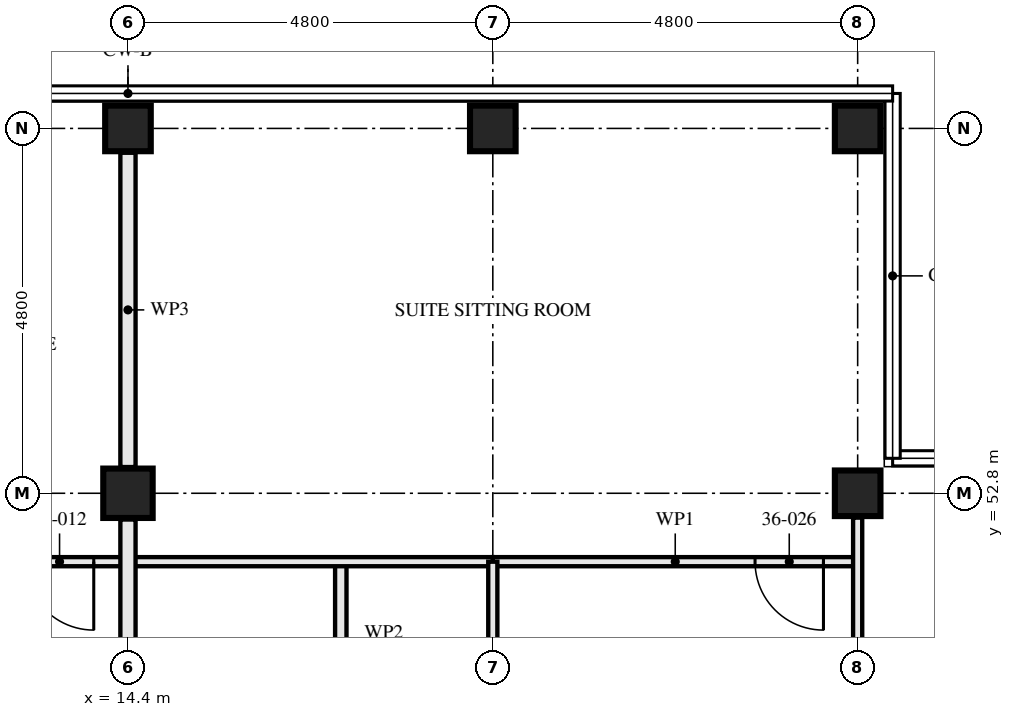
"""IFC4 building model, lengths in metres.
Left out: names, types, materials, properties, quantities, classifications, styles, units other than length and angle.
Written with IfcOpenShell. Run it as: python <this file> out.ifc"""

import sys

from ifc_helpers import new_model, si_unit, direction, frame, frame_2d, origin, origin_2d, place, context, subcontext, project, spatial, rectangle, hollow_rectangle, extrude, element, fill, save


model = new_model("IFC4")
c1 = context("Model", 3, precision=1e-05, world=origin(), true_north=direction((0.0, 1.0)))
c2 = subcontext(c1, "Body", "Model", "MODEL_VIEW")
j1 = project(units=[si_unit("LENGTHUNIT", "METRE"), si_unit("PLANEANGLEUNIT", "RADIAN")], contexts=[c1])
p1 = place(None, origin())
s1 = spatial("IfcSite", under=j1, at=p1, CompositionType="ELEMENT")
p2 = place(p1, origin())
s2 = spatial("IfcBuilding", under=s1, at=p2, CompositionType="ELEMENT")
p3 = place(p2, frame((0.0, 0.0, 133.0)))
s3 = spatial("IfcBuildingStorey", under=s2, at=p3, CompositionType="ELEMENT", Elevation=133.0)
p4 = place(p3, frame((14.4, 52.8, 0.0), z_axis=(0.0, 0.0, 1.0), x_axis=(1.0, 0.0, 0.0)))
e1 = element("IfcColumn", 1, at=p4, inside=s3, PredefinedType="COLUMN", context=c2, shape_type="SweptSolid", body=[
    extrude(hollow_rectangle(XDim=0.65, YDim=0.65, WallThickness=0.05, at=origin_2d()), origin(), (0.0, 0.0, 1.0), 3.5),
])
for number, where, z_axis, x_axis in (
    (2, (14.4, 57.6, 0.0), (0.0, 0.0, 1.0), (0.0, 1.0, 0.0)),
    (3, (19.2, 57.6, 0.0), (0.0, 0.0, 1.0), (0.0, 1.0, 0.0)),
    (4, (24.0, 52.8, 0.0), (0.0, 0.0, 1.0), (0.0, 1.0, 0.0)),
    (5, (24.0, 57.6, 0.0), (0.0, 0.0, 1.0), (0.0, 1.0, 0.0)),
):
    element("IfcColumn", number, at=place(p3, frame(where, z_axis=z_axis, x_axis=x_axis)), inside=s3, PredefinedType="COLUMN", context=c2, shape_type="SweptSolid", body=[
        extrude(hollow_rectangle(XDim=0.6, YDim=0.6, WallThickness=0.08, at=origin_2d()), origin(), (0.0, 0.0, 1.0), 3.5),
    ])
p5 = place(p3, frame((14.4, 51.9, 0.0), z_axis=(0.0, 0.0, 1.0), x_axis=(-1.0, 0.0, 0.0)))
e6 = element("IfcWall", 6, at=p5, inside=s3, PredefinedType="PARTITIONING", context=c2, shape_type="SweptSolid", body=[
    extrude(rectangle(XDim=4.8, YDim=0.12, at=frame_2d((2.4, 0.0))), origin(), (0.0, 0.0, 1.0), 3.25),
])
p6 = place(p5, frame((0.45, 0.0, 0.0)))
e7 = element("IfcOpeningElement", 7, at=p6, cuts=e6, PredefinedType="OPENING", context=c2, shape_type="SweptSolid", body=[
    extrude(rectangle(XDim=0.9, YDim=2.1, at=frame_2d((0.45, 1.05))), frame((0.0, 0.071, 0.0), z_axis=(0.0, -1.0, 0.0), x_axis=(1.0, 0.0, 0.0)), (0.0, 0.0, 1.0), 0.141),
])
p7 = place(p5, frame((2.925, 0.0, 0.0)))
e8 = element("IfcOpeningElement", 8, at=p7, cuts=e6, PredefinedType="OPENING", context=c2, shape_type="SweptSolid", body=[
    extrude(rectangle(XDim=0.95, YDim=2.1, at=frame_2d((0.475, 1.05))), frame((0.0, 0.071, 0.0), z_axis=(0.0, -1.0, 0.0), x_axis=(1.0, 0.0, 0.0)), (0.0, 0.0, 1.0), 0.141),
])
p8 = place(p3, frame((17.2, 51.9, 0.0), z_axis=(0.0, 0.0, 1.0), x_axis=(0.0, -1.0, 0.0)))
e9 = element("IfcWall", 9, at=p8, inside=s3, PredefinedType="PARTITIONING", context=c2, shape_type="SweptSolid", body=[
    extrude(rectangle(XDim=3.0, YDim=0.15, at=frame_2d((1.5, 0.0))), origin(), (0.0, 0.0, 1.0), 3.25),
])
p9 = place(p8, frame((1.05, 0.0, 0.0)))
e10 = element("IfcOpeningElement", 10, at=p9, cuts=e9, PredefinedType="OPENING", context=c2, shape_type="SweptSolid", body=[
    extrude(rectangle(XDim=0.9, YDim=2.1, at=frame_2d((0.45, 1.05))), frame((0.0, 0.085, 0.0), z_axis=(0.0, -1.0, 0.0), x_axis=(1.0, 0.0, 0.0)), (0.0, 0.0, 1.0), 0.171),
])
p10 = place(p3, frame((19.2, 51.9, 0.0), z_axis=(0.0, 0.0, 1.0), x_axis=(0.0, -1.0, 0.0)))
e11 = element("IfcWall", 11, at=p10, inside=s3, PredefinedType="PARTITIONING", context=c2, shape_type="SweptSolid", body=[
    extrude(rectangle(XDim=6.75, YDim=0.12, at=frame_2d((3.375, 0.0))), origin(), (0.0, 0.0, 1.0), 2.04),
])
p11 = place(p10, frame((2.925, 0.0, 0.0)))
e12 = element("IfcOpeningElement", 12, at=p11, cuts=e11, PredefinedType="OPENING", context=c2, shape_type="SweptSolid", body=[
    extrude(rectangle(XDim=0.9, YDim=2.0, at=frame_2d((0.45, 1.0))), frame((0.0, 0.071, 0.0), z_axis=(0.0, -1.0, 0.0), x_axis=(1.0, 0.0, 0.0)), (0.0, 0.0, 1.0), 0.141),
])
p12 = place(p3, frame((24.0, 51.9, 0.0), z_axis=(0.0, 0.0, 1.0), x_axis=(-1.0, 0.0, 0.0)))
e13 = element("IfcWall", 13, at=p12, inside=s3, PredefinedType="PARTITIONING", context=c2, shape_type="SweptSolid", body=[
    extrude(rectangle(XDim=4.8, YDim=0.12, at=frame_2d((2.4, 0.0))), origin(), (0.0, 0.0, 1.0), 3.25),
])
p13 = place(p12, frame((0.45, 0.0, 0.0)))
e14 = element("IfcOpeningElement", 14, at=p13, cuts=e13, PredefinedType="OPENING", context=c2, shape_type="SweptSolid", body=[
    extrude(rectangle(XDim=0.9, YDim=2.1, at=frame_2d((0.45, 1.05))), frame((0.0, 0.071, 0.0), z_axis=(0.0, -1.0, 0.0), x_axis=(1.0, 0.0, 0.0)), (0.0, 0.0, 1.0), 0.141),
])
p14 = place(p3, frame((19.2, 51.9, 0.0), z_axis=(0.0, 0.0, 1.0), x_axis=(-1.0, 0.0, 0.0)))
e15 = element("IfcWall", 15, at=p14, inside=s3, PredefinedType="PARTITIONING", context=c2, shape_type="SweptSolid", body=[
    extrude(rectangle(XDim=4.8, YDim=0.12, at=frame_2d((2.4, 0.0))), origin(), (0.0, 0.0, 1.0), 3.25),
])
p15 = place(p3, frame((24.0, 52.48, 0.0), z_axis=(0.0, 0.0, 1.0), x_axis=(0.0, -1.0, 0.0)))
e16 = element("IfcWall", 16, at=p15, inside=s3, PredefinedType="PARTITIONING", context=c2, shape_type="SweptSolid", body=[
    extrude(rectangle(XDim=4.28, YDim=0.12, at=frame_2d((2.14, 0.0))), origin(), (0.0, 0.0, 1.0), 3.25),
])
p16 = place(p15, frame((1.93, 0.0, 0.0)))
e17 = element("IfcOpeningElement", 17, at=p16, cuts=e16, PredefinedType="OPENING", context=c2, shape_type="SweptSolid", body=[
    extrude(rectangle(XDim=0.9, YDim=2.1, at=frame_2d((0.45, 1.05))), frame((0.0, 0.071, 0.0), z_axis=(0.0, -1.0, 0.0), x_axis=(1.0, 0.0, 0.0)), (0.0, 0.0, 1.0), 0.141),
])
p17 = place(p3, frame((14.4, 48.345, 0.0), z_axis=(0.0, 0.0, 1.0), x_axis=(0.0, 1.0, 0.0)))
e18 = element("IfcWall", 18, at=p17, inside=s3, PredefinedType="PARTITIONING", context=c2, shape_type="SweptSolid", body=[
    extrude(rectangle(XDim=4.11, YDim=0.2, at=frame_2d((2.055, 0.0))), origin(), (0.0, 0.0, 1.0), 2.04),
])
p18 = place(p3, frame((14.4, 53.145, 0.0), z_axis=(0.0, 0.0, 1.0), x_axis=(0.0, 1.0, 0.0)))
e19 = element("IfcWall", 19, at=p18, inside=s3, PredefinedType="PARTITIONING", context=c2, shape_type="SweptSolid", body=[
    extrude(rectangle(XDim=4.135, YDim=0.2, at=frame_2d((2.067, 0.0))), origin(), (0.0, 0.0, 1.0), 2.04),
])
p19 = place(p6, origin())
e20 = element("IfcDoor", 20, at=p19, inside=s3, OperationType="SINGLE_SWING_RIGHT", PredefinedType="DOOR", context=c2, shape_type="SweptSolid", body=[
    extrude(rectangle(XDim=0.9, YDim=2.1, at=frame_2d((0.45, 1.05))), frame((0.0, 0.022, 0.0), z_axis=(0.0, -1.0, 0.0), x_axis=(1.0, 0.0, 0.0)), (0.0, 0.0, 1.0), 0.044),
])
fill(e7, e20)
p20 = place(p13, origin())
e21 = element("IfcDoor", 21, at=p20, inside=s3, OperationType="SINGLE_SWING_RIGHT", PredefinedType="DOOR", context=c2, shape_type="SweptSolid", body=[
    extrude(rectangle(XDim=0.9, YDim=2.1, at=frame_2d((0.45, 1.05))), frame((0.0, 0.022, 0.0), z_axis=(0.0, -1.0, 0.0), x_axis=(1.0, 0.0, 0.0)), (0.0, 0.0, 1.0), 0.044),
])
fill(e14, e21)
save(model, sys.argv[1])
